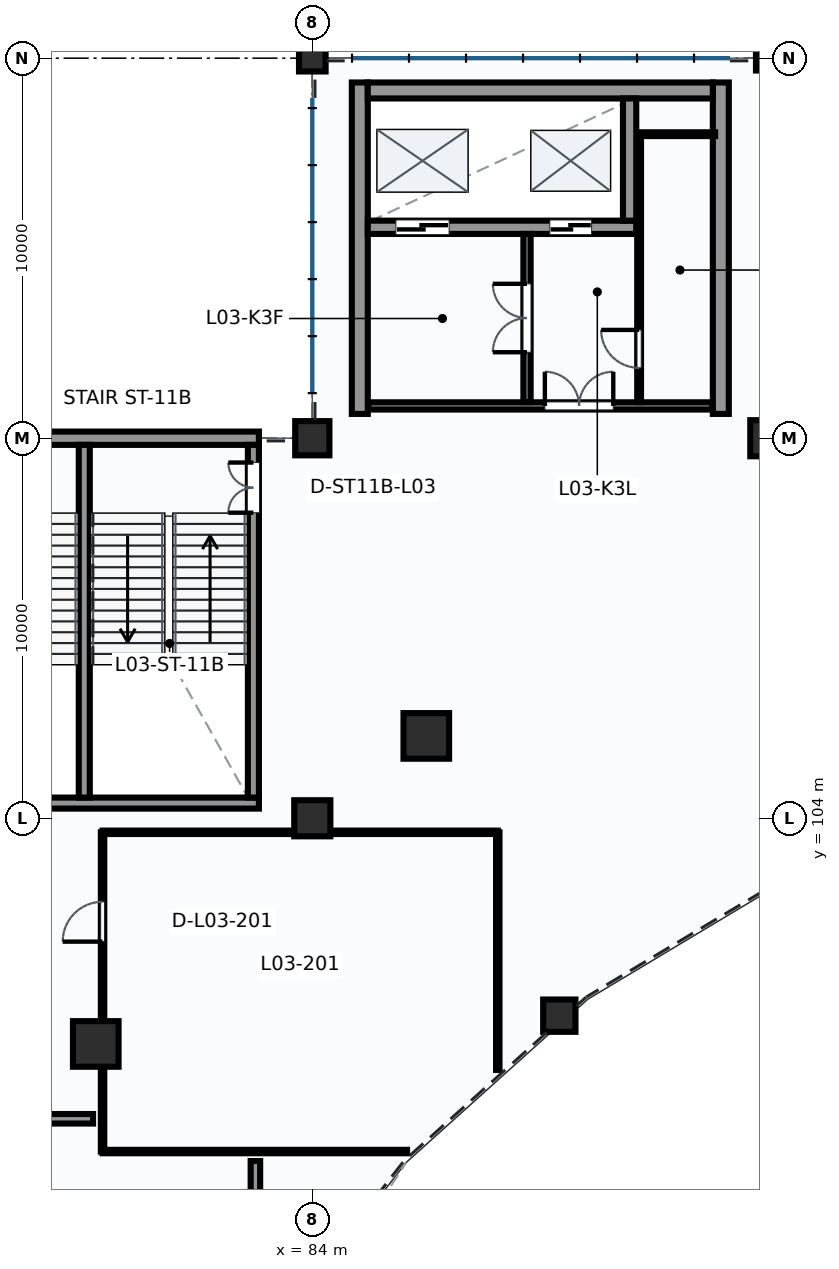
"""IFC4 building model, lengths in metres.
Left out: names, types, materials, properties, quantities, classifications, styles, units other than length and angle.
Written with IfcOpenShell. Run it as: python <this file> out.ifc"""

import sys

from ifc_helpers import new_model, si_unit, direction, frame, frame_2d, origin, origin_2d, place, context, subcontext, project, spatial, rectangle, circle, extrude, element, fill, save


model = new_model("IFC4")
c1 = context("Model", 3, precision=1e-05, world=origin(), true_north=direction((0.0, 1.0)))
c2 = subcontext(c1, "Body", "Model", "MODEL_VIEW")
j1 = project(units=[si_unit("LENGTHUNIT", "METRE"), si_unit("PLANEANGLEUNIT", "RADIAN")], contexts=[c1])
p1 = place(None, origin())
s1 = spatial("IfcSite", under=j1, at=p1, CompositionType="ELEMENT")
p2 = place(p1, origin())
s2 = spatial("IfcBuilding", under=s1, at=p2, CompositionType="ELEMENT")
p3 = place(p2, frame((0.0, 0.0, 14.7)))
s3 = spatial("IfcBuildingStorey", under=s2, at=p3, CompositionType="ELEMENT", Elevation=14.7)
p4 = place(p3, frame((84.0, 104.0, 0.0), z_axis=(0.0, 0.0, 1.0), x_axis=(1.0, 0.0, 0.0)))
e1 = element("IfcColumn", 1, at=p4, inside=s3, PredefinedType="COLUMN", context=c2, shape_type="SweptSolid", body=[
    extrude(rectangle(XDim=0.95, YDim=0.95, at=origin_2d()), origin(), (0.0, 0.0, 1.0), 4.5),
])
p5 = place(p3, frame((84.0, 114.0, 0.0), z_axis=(0.0, 0.0, 1.0), x_axis=(1.0, 0.0, 0.0)))
e2 = element("IfcColumn", 2, at=p5, inside=s3, PredefinedType="COLUMN", context=c2, shape_type="SweptSolid", body=[
    extrude(circle(Radius=0.45, at=origin_2d()), origin(), (0.0, 0.0, 1.0), 4.5),
])
p6 = place(p3, frame((84.0, 124.0, 0.0), z_axis=(0.0, 0.0, 1.0), x_axis=(1.0, 0.0, 0.0)))
e3 = element("IfcColumn", 3, at=p6, inside=s3, PredefinedType="COLUMN", context=c2, shape_type="SweptSolid", body=[
    extrude(rectangle(XDim=0.7, YDim=0.7, at=origin_2d()), origin(), (0.0, 0.0, 1.0), 4.5),
])
p7 = place(p3, frame((96.0, 114.0, 0.0), z_axis=(0.0, 0.0, 1.0), x_axis=(1.0, 0.0, 0.0)))
e4 = element("IfcColumn", 4, at=p7, inside=s3, PredefinedType="COLUMN", context=c2, shape_type="SweptSolid", body=[
    extrude(rectangle(XDim=0.95, YDim=0.95, at=origin_2d()), origin(), (0.0, 0.0, 1.0), 4.5),
])
p8 = place(p3, frame((96.0, 124.0, 0.0), z_axis=(0.0, 0.0, 1.0), x_axis=(1.0, 0.0, 0.0)))
e5 = element("IfcColumn", 5, at=p8, inside=s3, PredefinedType="COLUMN", context=c2, shape_type="SweptSolid", body=[
    extrude(rectangle(XDim=0.65, YDim=0.65, at=origin_2d()), origin(), (0.0, 0.0, 1.0), 4.5),
])
p9 = place(p3, frame((90.5, 98.806, 0.0), z_axis=(0.0, 0.0, 1.0), x_axis=(1.0, 0.0, 0.0)))
e6 = element("IfcColumn", 6, at=p9, inside=s3, PredefinedType="COLUMN", context=c2, shape_type="SweptSolid", body=[
    extrude(rectangle(XDim=0.85, YDim=0.85, at=origin_2d()), origin(), (0.0, 0.0, 1.0), 2.25),
])
for number, where, z_axis, x_axis in (
    (7, (87.0, 106.167, 0.0), (0.0, 0.0, 1.0), (1.0, 0.0, 0.0)),
    (8, (78.302, 98.062, 0.0), (0.0, 0.0, 1.0), (1.0, 0.0, 0.0)),
):
    element("IfcColumn", number, at=place(p3, frame(where, z_axis=z_axis, x_axis=x_axis)), inside=s3, PredefinedType="COLUMN", context=c2, shape_type="SweptSolid", body=[
        extrude(rectangle(XDim=1.2, YDim=1.2, at=origin_2d()), origin(), (0.0, 0.0, 1.0), 4.5),
    ])
p10 = place(p3, frame((73.405, 104.4, 0.0), z_axis=(0.0, 0.0, 1.0), x_axis=(1.0, 0.0, 0.0)))
e9 = element("IfcWall", 9, at=p10, inside=s3, PredefinedType="SHEAR", context=c2, shape_type="SweptSolid", body=[
    extrude(rectangle(XDim=9.19, YDim=0.29, at=frame_2d((4.595, 0.0))), origin(), (0.0, 0.0, 1.0), 4.5),
])
p11 = place(p3, frame((73.405, 114.0, 0.0), z_axis=(0.0, 0.0, 1.0), x_axis=(1.0, 0.0, 0.0)))
e10 = element("IfcWall", 10, at=p11, inside=s3, PredefinedType="SHEAR", context=c2, shape_type="SweptSolid", body=[
    extrude(rectangle(XDim=9.19, YDim=0.35, at=frame_2d((4.595, 0.0))), origin(), (0.0, 0.0, 1.0), 3.674),
])
p12 = place(p3, frame((82.45, 104.545, 0.0), z_axis=(0.0, 0.0, 1.0), x_axis=(0.0, 1.0, 0.0)))
e11 = element("IfcWall", 11, at=p12, inside=s3, PredefinedType="SHEAR", context=c2, shape_type="SweptSolid", body=[
    extrude(rectangle(XDim=9.28, YDim=0.29, at=frame_2d((4.64, 0.0))), origin(), (0.0, 0.0, 1.0), 4.5),
])
p13 = place(p12, frame((7.495, 0.0, 0.0)))
e12 = element("IfcOpeningElement", 12, at=p13, cuts=e11, PredefinedType="OPENING", context=c2, shape_type="SweptSolid", body=[
    extrude(rectangle(XDim=1.32, YDim=2.2, at=frame_2d((0.66, 1.1))), frame((0.0, 0.155, 0.0), z_axis=(0.0, -1.0, 0.0), x_axis=(1.0, 0.0, 0.0)), (0.0, 0.0, 1.0), 0.31),
])
p14 = place(p3, frame((78.0, 104.545, 0.0), z_axis=(0.0, 0.0, 1.0), x_axis=(0.0, 1.0, 0.0)))
e13 = element("IfcWall", 13, at=p14, inside=s3, PredefinedType="SHEAR", context=c2, shape_type="SweptSolid", body=[
    extrude(rectangle(XDim=9.28, YDim=0.29, at=frame_2d((4.64, 0.0))), origin(), (0.0, 0.0, 1.0), 4.5),
])
for number, where, z_axis, x_axis in (
    (14, (85.25, 114.64, 0.0), (0.0, 0.0, 1.0), (0.0, 1.0, 0.0)),
    (15, (94.75, 114.64, 0.0), (0.0, 0.0, 1.0), (0.0, 1.0, 0.0)),
):
    element("IfcWall", number, at=place(p3, frame(where, z_axis=z_axis, x_axis=x_axis)), inside=s3, PredefinedType="SHEAR", context=c2, shape_type="SweptSolid", body=[
        extrude(rectangle(XDim=8.72, YDim=0.42, at=frame_2d((4.36, 0.0))), origin(), (0.0, 0.0, 1.0), 4.5),
    ])
p15 = place(p3, frame((85.46, 123.15, 0.0), z_axis=(0.0, 0.0, 1.0), x_axis=(1.0, 0.0, 0.0)))
e16 = element("IfcWall", 16, at=p15, inside=s3, PredefinedType="SHEAR", context=c2, shape_type="SweptSolid", body=[
    extrude(rectangle(XDim=9.08, YDim=0.42, at=frame_2d((4.54, 0.0))), origin(), (0.0, 0.0, 1.0), 4.5),
])
p16 = place(p3, frame((85.46, 119.55, 0.0), z_axis=(0.0, 0.0, 1.0), x_axis=(1.0, 0.0, 0.0)))
e17 = element("IfcWall", 17, at=p16, inside=s3, PredefinedType="SHEAR", context=c2, shape_type="SweptSolid", body=[
    extrude(rectangle(XDim=7.065, YDim=0.35, at=frame_2d((3.532, 0.0))), origin(), (0.0, 0.0, 1.0), 4.5),
])
p17 = place(p16, frame((0.74, 0.0, 0.0)))
e18 = element("IfcOpeningElement", 18, at=p17, cuts=e17, PredefinedType="OPENING", context=c2, shape_type="SweptSolid", body=[
    extrude(rectangle(XDim=1.4, YDim=2.3, at=frame_2d((0.7, 1.15))), frame((0.0, 0.185, 0.0), z_axis=(0.0, -1.0, 0.0), x_axis=(1.0, 0.0, 0.0)), (0.0, 0.0, 1.0), 0.37),
])
p18 = place(p16, frame((4.79, 0.0, 0.0)))
e19 = element("IfcOpeningElement", 19, at=p18, cuts=e17, PredefinedType="OPENING", context=c2, shape_type="SweptSolid", body=[
    extrude(rectangle(XDim=1.1, YDim=2.2, at=frame_2d((0.55, 1.1))), frame((0.0, 0.185, 0.0), z_axis=(0.0, -1.0, 0.0), x_axis=(1.0, 0.0, 0.0)), (0.0, 0.0, 1.0), 0.37),
])
p19 = place(p3, frame((92.35, 119.725, 0.0), z_axis=(0.0, 0.0, 1.0), x_axis=(0.0, 1.0, 0.0)))
e20 = element("IfcWall", 20, at=p19, inside=s3, PredefinedType="SHEAR", context=c2, shape_type="SweptSolid", body=[
    extrude(rectangle(XDim=3.215, YDim=0.35, at=frame_2d((1.607, 0.0))), origin(), (0.0, 0.0, 1.0), 4.5),
])
p20 = place(p3, frame((85.47, 114.85, 0.0), z_axis=(0.0, 0.0, 1.0), x_axis=(1.0, 0.0, 0.0)))
e21 = element("IfcWall", 21, at=p20, inside=s3, PredefinedType="PARTITIONING", context=c2, shape_type="SweptSolid", body=[
    extrude(rectangle(XDim=9.06, YDim=0.19, at=frame_2d((4.53, 0.0))), origin(), (0.0, 0.0, 1.0), 4.16),
])
p21 = place(p20, frame((4.65, 0.0, 0.0)))
e22 = element("IfcOpeningElement", 22, at=p21, cuts=e21, PredefinedType="OPENING", context=c2, shape_type="SweptSolid", body=[
    extrude(rectangle(XDim=1.8, YDim=2.3, at=frame_2d((0.9, 1.15))), frame((0.0, 0.105, 0.0), z_axis=(0.0, -1.0, 0.0), x_axis=(1.0, 0.0, 0.0)), (0.0, 0.0, 1.0), 0.21),
])
p22 = place(p3, frame((89.65, 114.95, 0.0), z_axis=(0.0, 0.0, 1.0), x_axis=(0.0, 1.0, 0.0)))
e23 = element("IfcWall", 23, at=p22, inside=s3, PredefinedType="PARTITIONING", context=c2, shape_type="SweptSolid", body=[
    extrude(rectangle(XDim=4.425, YDim=0.19, at=frame_2d((2.212, 0.0))), origin(), (0.0, 0.0, 1.0), 4.16),
])
p23 = place(p22, frame((1.313, 0.0, 0.0)))
e24 = element("IfcOpeningElement", 24, at=p23, cuts=e23, PredefinedType="OPENING", context=c2, shape_type="SweptSolid", body=[
    extrude(rectangle(XDim=1.8, YDim=2.2, at=frame_2d((0.9, 1.1))), frame((0.0, 0.105, 0.0), z_axis=(0.0, -1.0, 0.0), x_axis=(1.0, 0.0, 0.0)), (0.0, 0.0, 1.0), 0.21),
])
p24 = place(p3, frame((92.6, 114.95, 0.0), z_axis=(0.0, 0.0, 1.0), x_axis=(0.0, 1.0, 0.0)))
e25 = element("IfcWall", 25, at=p24, inside=s3, PredefinedType="PARTITIONING", context=c2, shape_type="SweptSolid", body=[
    extrude(rectangle(XDim=7.05, YDim=0.1, at=frame_2d((3.525, 0.0))), origin(), (0.0, 0.0, 1.0), 4.16),
])
p25 = place(p24, frame((0.9, 0.0, 0.0)))
e26 = element("IfcOpeningElement", 26, at=p25, cuts=e25, PredefinedType="OPENING", context=c2, shape_type="SweptSolid", body=[
    extrude(rectangle(XDim=1.0, YDim=2.1, at=frame_2d((0.5, 1.05))), frame((0.0, 0.06, 0.0), z_axis=(0.0, -1.0, 0.0), x_axis=(1.0, 0.0, 0.0)), (0.0, 0.0, 1.0), 0.12),
])
p26 = place(p3, frame((92.6, 122.0, 0.0), z_axis=(0.0, 0.0, 1.0), x_axis=(1.0, 0.0, 0.0)))
e27 = element("IfcWall", 27, at=p26, inside=s3, PredefinedType="PARTITIONING", context=c2, shape_type="SweptSolid", body=[
    extrude(rectangle(XDim=2.0, YDim=0.1, at=frame_2d((1.0, 0.0))), origin(), (0.0, 0.0, 1.0), 4.16),
])
p27 = place(p3, frame((78.481, 103.631, 0.0), z_axis=(0.0, 0.0, 1.0), x_axis=(1.0, 0.0, 0.0)))
e28 = element("IfcWall", 28, at=p27, inside=s3, PredefinedType="PARTITIONING", context=c2, shape_type="SweptSolid", body=[
    extrude(rectangle(XDim=10.4, YDim=0.09, at=frame_2d((5.2, 0.0))), origin(), (0.0, 0.0, 1.0), 2.603),
])
p28 = place(p3, frame((88.881, 103.631, 0.0), z_axis=(0.0, 0.0, 1.0), x_axis=(0.0, -1.0, 0.0)))
e29 = element("IfcWall", 29, at=p28, inside=s3, PredefinedType="PARTITIONING", context=c2, shape_type="SweptSolid", body=[
    extrude(rectangle(XDim=6.252, YDim=0.09, at=frame_2d((3.126, 0.0))), origin(), (0.0, 0.0, 1.0), 4.16),
])
p29 = place(p3, frame((86.492, 95.231, 0.0), z_axis=(0.0, 0.0, 1.0), x_axis=(-1.0, 0.0, 0.0)))
e30 = element("IfcWall", 30, at=p29, inside=s3, PredefinedType="PARTITIONING", context=c2, shape_type="SweptSolid", body=[
    extrude(rectangle(XDim=8.011, YDim=0.09, at=frame_2d((4.005, 0.0))), origin(), (0.0, 0.0, 1.0), 4.16),
])
p30 = place(p3, frame((78.481, 95.231, 0.0), z_axis=(0.0, 0.0, 1.0), x_axis=(0.0, 1.0, 0.0)))
e31 = element("IfcWall", 31, at=p30, inside=s3, PredefinedType="PARTITIONING", context=c2, shape_type="SweptSolid", body=[
    extrude(rectangle(XDim=8.4, YDim=0.09, at=frame_2d((4.2, 0.0))), origin(), (0.0, 0.0, 1.0), 2.603),
])
p31 = place(p30, frame((5.523, 0.0, 0.0)))
e32 = element("IfcOpeningElement", 32, at=p31, cuts=e31, PredefinedType="OPENING", context=c2, shape_type="SweptSolid", body=[
    extrude(rectangle(XDim=1.05, YDim=2.2, at=frame_2d((0.525, 1.1))), frame((0.0, 0.055, 0.0), z_axis=(0.0, -1.0, 0.0), x_axis=(1.0, 0.0, 0.0)), (0.0, 0.0, 1.0), 0.11),
])
p32 = place(p3, frame((72.103, 96.093, 0.0), z_axis=(0.0, 0.0, 1.0), x_axis=(1.0, 0.0, 0.0)))
e33 = element("IfcWall", 33, at=p32, inside=s3, PredefinedType="SOLIDWALL", context=c2, shape_type="SweptSolid", body=[
    extrude(rectangle(XDim=6.128, YDim=0.25, at=frame_2d((3.064, 0.0))), origin(), (0.0, 0.0, 1.0), 3.49),
])
p33 = place(p3, frame((82.503, 94.981, 0.0), z_axis=(0.0, 0.0, 1.0), x_axis=(0.0, -1.0, 0.0)))
e34 = element("IfcWall", 34, at=p33, inside=s3, PredefinedType="SOLIDWALL", context=c2, shape_type="SweptSolid", body=[
    extrude(rectangle(XDim=4.804, YDim=0.25, at=frame_2d((2.402, 0.0))), origin(), (0.0, 0.0, 1.0), 4.16),
])
p34 = place(p13, origin())
e35 = element("IfcDoor", 35, at=p34, inside=s3, OperationType="DOUBLE_DOOR_SINGLE_SWING", PredefinedType="DOOR", context=c2, shape_type="SweptSolid", body=[
    extrude(rectangle(XDim=1.32, YDim=2.2, at=frame_2d((0.66, 1.1))), frame((0.0, 0.025, 0.0), z_axis=(0.0, -1.0, 0.0), x_axis=(1.0, 0.0, 0.0)), (0.0, 0.0, 1.0), 0.05),
])
fill(e12, e35)
p35 = place(p17, origin())
e36 = element("IfcDoor", 36, at=p35, inside=s3, OperationType="SLIDING_TO_LEFT", PredefinedType="DOOR", context=c2, shape_type="SweptSolid", body=[
    extrude(rectangle(XDim=1.4, YDim=2.3, at=frame_2d((0.7, 1.15))), frame((0.0, 0.025, 0.0), z_axis=(0.0, -1.0, 0.0), x_axis=(1.0, 0.0, 0.0)), (0.0, 0.0, 1.0), 0.05),
])
fill(e18, e36)
p36 = place(p18, origin())
e37 = element("IfcDoor", 37, at=p36, inside=s3, OperationType="SLIDING_TO_LEFT", PredefinedType="DOOR", context=c2, shape_type="SweptSolid", body=[
    extrude(rectangle(XDim=1.1, YDim=2.2, at=frame_2d((0.55, 1.1))), frame((0.0, 0.025, 0.0), z_axis=(0.0, -1.0, 0.0), x_axis=(1.0, 0.0, 0.0)), (0.0, 0.0, 1.0), 0.05),
])
fill(e19, e37)
p37 = place(p21, origin())
e38 = element("IfcDoor", 38, at=p37, inside=s3, OperationType="DOUBLE_DOOR_SINGLE_SWING", PredefinedType="DOOR", context=c2, shape_type="SweptSolid", body=[
    extrude(rectangle(XDim=1.8, YDim=2.3, at=frame_2d((0.9, 1.15))), frame((0.0, 0.025, 0.0), z_axis=(0.0, -1.0, 0.0), x_axis=(1.0, 0.0, 0.0)), (0.0, 0.0, 1.0), 0.05),
])
fill(e22, e38)
p38 = place(p23, origin())
e39 = element("IfcDoor", 39, at=p38, inside=s3, OperationType="DOUBLE_DOOR_SINGLE_SWING", PredefinedType="DOOR", context=c2, shape_type="SweptSolid", body=[
    extrude(rectangle(XDim=1.8, YDim=2.2, at=frame_2d((0.9, 1.1))), frame((0.0, 0.025, 0.0), z_axis=(0.0, -1.0, 0.0), x_axis=(1.0, 0.0, 0.0)), (0.0, 0.0, 1.0), 0.05),
])
fill(e24, e39)
p39 = place(p25, origin())
e40 = element("IfcDoor", 40, at=p39, inside=s3, OperationType="SINGLE_SWING_RIGHT", PredefinedType="DOOR", context=c2, shape_type="SweptSolid", body=[
    extrude(rectangle(XDim=1.0, YDim=2.1, at=frame_2d((0.5, 1.05))), frame((0.0, 0.025, 0.0), z_axis=(0.0, -1.0, 0.0), x_axis=(1.0, 0.0, 0.0)), (0.0, 0.0, 1.0), 0.05),
])
fill(e26, e40)
p40 = place(p31, origin())
e41 = element("IfcDoor", 41, at=p40, inside=s3, OperationType="SINGLE_SWING_LEFT", PredefinedType="DOOR", context=c2, shape_type="SweptSolid", body=[
    extrude(rectangle(XDim=1.05, YDim=2.2, at=frame_2d((0.525, 1.1))), frame((0.0, 0.025, 0.0), z_axis=(0.0, -1.0, 0.0), x_axis=(1.0, 0.0, 0.0)), (0.0, 0.0, 1.0), 0.05),
])
fill(e32, e41)
save(model, sys.argv[1])
